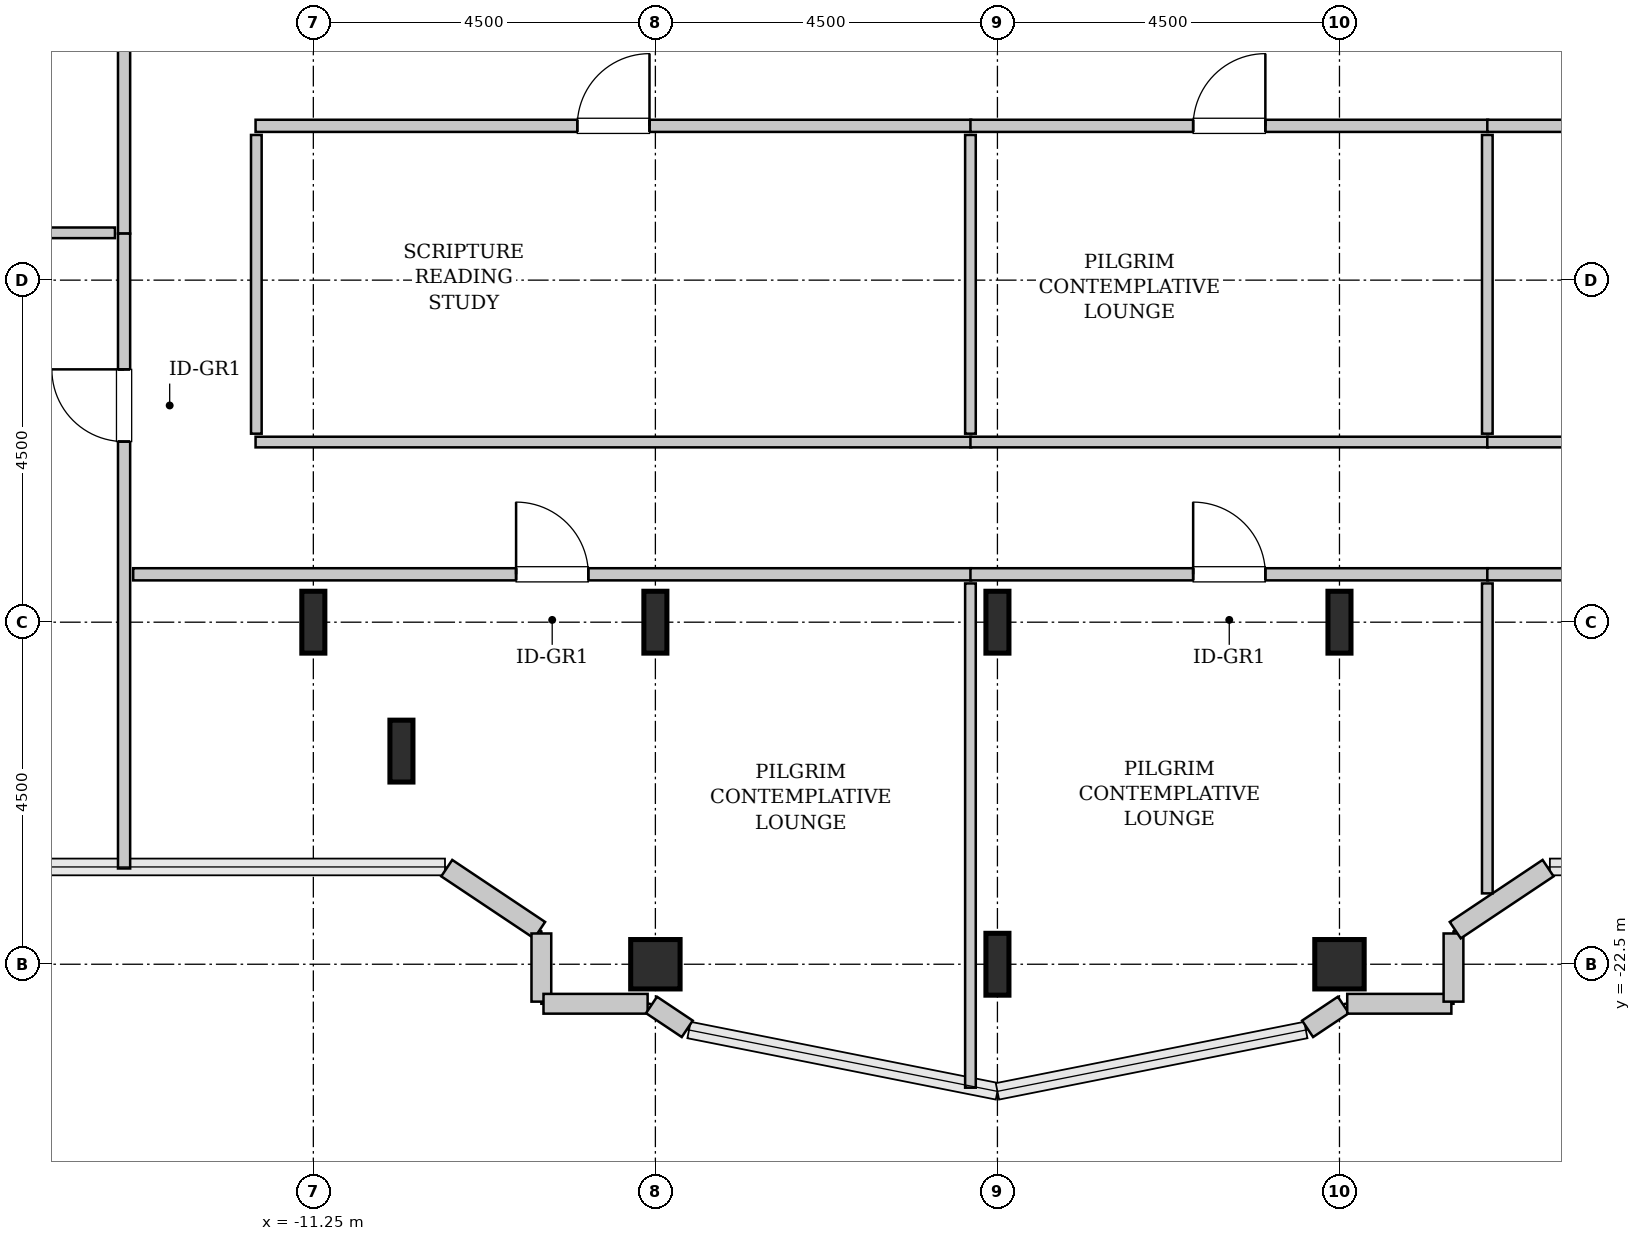
"""IFC4 building model, lengths in metres.
Left out: names, types, materials, properties, quantities, classifications, styles, units other than length and angle.
Written with IfcOpenShell. Run it as: python <this file> out.ifc"""

import sys

from ifc_helpers import new_model, si_unit, direction, frame, frame_2d, origin, origin_2d, place, context, subcontext, project, spatial, rectangle, hollow_rectangle, i_section, extrude, source, transform, mapped, element, fill, save


model = new_model("IFC4")
c1 = context("Model", 3, precision=1e-05, world=origin(), true_north=direction((0.0, 1.0)))
c2 = subcontext(c1, "Body", "Model", "MODEL_VIEW")
j1 = project(units=[si_unit("LENGTHUNIT", "METRE"), si_unit("PLANEANGLEUNIT", "RADIAN")], contexts=[c1])
p1 = place(None, origin())
s1 = spatial("IfcSite", under=j1, at=p1, CompositionType="ELEMENT")
p2 = place(p1, origin())
s2 = spatial("IfcBuilding", under=s1, at=p2, CompositionType="ELEMENT")
p3 = place(p2, frame((0.0, 0.0, 221.8)))
s3 = spatial("IfcBuildingStorey", under=s2, at=p3, CompositionType="ELEMENT", Elevation=221.8)
m1 = source(origin(), c2, "Body", "SweptSolid", [
    extrude(i_section(OverallWidth=0.303, OverallDepth=0.814, WebThickness=0.021, FlangeThickness=0.04, FilletRadius=0.03, at=origin_2d()), origin(), (0.0, 0.0, 1.0), 3.8),
])
for number, where, z_axis, x_axis in (
    (1, (-11.25, -18.0, 0.0), (0.0, 0.0, 1.0), (1.0, 0.0, 0.0)),
    (2, (-10.091, -19.696, 0.0), (0.0, 0.0, 1.0), (1.0, 0.0, 0.0)),
):
    element("IfcColumn", number, at=place(p3, frame(where, z_axis=z_axis, x_axis=x_axis)), inside=s3, PredefinedType="COLUMN", context=c2, shape_type="MappedRepresentation", body=[
        mapped(m1, transform((0.0, 0.0, 0.0), x_axis=(1.0, 0.0, 0.0), y_axis=(0.0, 1.0, 0.0), z_axis=(0.0, 0.0, 1.0), scale=1.0)),
    ])
m2 = source(origin(), c2, "Body", "SweptSolid", [
    extrude(hollow_rectangle(XDim=0.65, YDim=0.65, WallThickness=0.032, InnerFilletRadius=0.032, OuterFilletRadius=0.064, at=origin_2d()), origin(), (0.0, 0.0, 1.0), 3.8),
])
p4 = place(p3, frame((-6.75, -22.5, 0.0), z_axis=(0.0, 0.0, 1.0), x_axis=(1.0, 0.0, 0.0)))
e3 = element("IfcColumn", 3, at=p4, inside=s3, PredefinedType="COLUMN", context=c2, shape_type="MappedRepresentation", body=[
    mapped(m2, transform((0.0, 0.0, 0.0), x_axis=(1.0, 0.0, 0.0), y_axis=(0.0, 1.0, 0.0), z_axis=(0.0, 0.0, 1.0), scale=1.0)),
])
for number, where, z_axis, x_axis in (
    (4, (-6.75, -18.0, 0.0), (0.0, 0.0, 1.0), (1.0, 0.0, 0.0)),
    (5, (-2.25, -22.5, 0.0), (0.0, 0.0, 1.0), (1.0, 0.0, 0.0)),
    (6, (-2.25, -18.0, 0.0), (0.0, 0.0, 1.0), (1.0, 0.0, 0.0)),
):
    element("IfcColumn", number, at=place(p3, frame(where, z_axis=z_axis, x_axis=x_axis)), inside=s3, PredefinedType="COLUMN", context=c2, shape_type="MappedRepresentation", body=[
        mapped(m1, transform((0.0, 0.0, 0.0), x_axis=(1.0, 0.0, 0.0), y_axis=(0.0, 1.0, 0.0), z_axis=(0.0, 0.0, 1.0), scale=1.0)),
    ])
p5 = place(p3, frame((2.25, -22.5, 0.0), z_axis=(0.0, 0.0, 1.0), x_axis=(1.0, 0.0, 0.0)))
e7 = element("IfcColumn", 7, at=p5, inside=s3, PredefinedType="COLUMN", context=c2, shape_type="MappedRepresentation", body=[
    mapped(m2, transform((0.0, 0.0, 0.0), x_axis=(1.0, 0.0, 0.0), y_axis=(0.0, 1.0, 0.0), z_axis=(0.0, 0.0, 1.0), scale=1.0)),
])
p6 = place(p3, frame((2.25, -18.0, 0.0), z_axis=(0.0, 0.0, 1.0), x_axis=(1.0, 0.0, 0.0)))
e8 = element("IfcColumn", 8, at=p6, inside=s3, PredefinedType="COLUMN", context=c2, shape_type="MappedRepresentation", body=[
    mapped(m1, transform((0.0, 0.0, 0.0), x_axis=(1.0, 0.0, 0.0), y_axis=(0.0, 1.0, 0.0), z_axis=(0.0, 0.0, 1.0), scale=1.0)),
])
m3 = source(origin(), c2, "Body", "SweptSolid", [
    extrude(rectangle(XDim=1.469, YDim=0.26, at=frame_2d((0.734, 0.0))), origin(), (0.0, 0.0, 1.0), 3.55),
])
p7 = place(p3, frame((-9.495, -21.236, 0.0), z_axis=(0.0, 0.0, 1.0), x_axis=(0.831461760506, -0.555581983884, 0.0)))
e9 = element("IfcWall", 9, at=p7, inside=s3, PredefinedType="SOLIDWALL", context=c2, shape_type="MappedRepresentation", body=[
    mapped(m3, transform((0.0, 0.0, 0.0), x_axis=(1.0, 0.0, 0.0), y_axis=(0.0, 1.0, 0.0), z_axis=(0.0, 0.0, 1.0), scale=1.0)),
])
m4 = source(origin(), c2, "Body", "SweptSolid", [
    extrude(rectangle(XDim=0.897, YDim=0.26, at=frame_2d((0.448, 0.0))), origin(), (0.0, 0.0, 1.0), 3.55),
])
p8 = place(p3, frame((-8.25, -22.095, 0.0), z_axis=(0.0, 0.0, 1.0), x_axis=(0.0, -1.0, 0.0)))
e10 = element("IfcWall", 10, at=p8, inside=s3, PredefinedType="SOLIDWALL", context=c2, shape_type="MappedRepresentation", body=[
    mapped(m4, transform((0.0, 0.0, 0.0), x_axis=(1.0, 0.0, 0.0), y_axis=(0.0, 1.0, 0.0), z_axis=(0.0, 0.0, 1.0), scale=1.0)),
])
m5 = source(origin(), c2, "Body", "SweptSolid", [
    extrude(rectangle(XDim=1.37, YDim=0.26, at=frame_2d((0.685, 0.0))), origin(), (0.0, 0.0, 1.0), 3.55),
])
p9 = place(p3, frame((-8.222, -23.02, 0.0), z_axis=(0.0, 0.0, 1.0), x_axis=(1.0, 0.0, 0.0)))
e11 = element("IfcWall", 11, at=p9, inside=s3, PredefinedType="SOLIDWALL", context=c2, shape_type="MappedRepresentation", body=[
    mapped(m5, transform((0.0, 0.0, 0.0), x_axis=(1.0, 0.0, 0.0), y_axis=(0.0, 1.0, 0.0), z_axis=(0.0, 0.0, 1.0), scale=1.0)),
])
m6 = source(origin(), c2, "Body", "SweptSolid", [
    extrude(rectangle(XDim=0.565, YDim=0.26, at=frame_2d((0.283, 0.0))), origin(), (0.0, 0.0, 1.0), 3.55),
])
for number, where, z_axis, x_axis in (
    (12, (-6.801, -23.036, 0.0), (0.0, 0.0, 1.0), (0.832, -0.555, 0.0)),
    (13, (1.831, -23.35, 0.0), (0.0, 0.0, 1.0), (0.832, 0.555, 0.0)),
):
    element("IfcWall", number, at=place(p3, frame(where, z_axis=z_axis, x_axis=x_axis)), inside=s3, PredefinedType="SOLIDWALL", context=c2, shape_type="MappedRepresentation", body=[
        mapped(m6, transform((0.0, 0.0, 0.0), x_axis=(1.0, 0.0, 0.0), y_axis=(0.0, 1.0, 0.0), z_axis=(0.0, 0.0, 1.0), scale=1.0)),
    ])
p10 = place(p3, frame((2.352, -23.02, 0.0), z_axis=(0.0, 0.0, 1.0), x_axis=(1.0, 0.0, 0.0)))
e14 = element("IfcWall", 14, at=p10, inside=s3, PredefinedType="SOLIDWALL", context=c2, shape_type="MappedRepresentation", body=[
    mapped(m5, transform((0.0, 0.0, 0.0), x_axis=(1.0, 0.0, 0.0), y_axis=(0.0, 1.0, 0.0), z_axis=(0.0, 0.0, 1.0), scale=1.0)),
])
p11 = place(p3, frame((3.75, -22.992, 0.0), z_axis=(0.0, 0.0, 1.0), x_axis=(0.0, 1.0, 0.0)))
e15 = element("IfcWall", 15, at=p11, inside=s3, PredefinedType="SOLIDWALL", context=c2, shape_type="MappedRepresentation", body=[
    mapped(m4, transform((0.0, 0.0, 0.0), x_axis=(1.0, 0.0, 0.0), y_axis=(0.0, 1.0, 0.0), z_axis=(0.0, 0.0, 1.0), scale=1.0)),
])
p12 = place(p3, frame((3.773, -22.052, 0.0), z_axis=(0.0, 0.0, 1.0), x_axis=(0.831461760506, 0.555581983884, 0.0)))
e16 = element("IfcWall", 16, at=p12, inside=s3, PredefinedType="SOLIDWALL", context=c2, shape_type="MappedRepresentation", body=[
    mapped(m3, transform((0.0, 0.0, 0.0), x_axis=(1.0, 0.0, 0.0), y_axis=(0.0, 1.0, 0.0), z_axis=(0.0, 0.0, 1.0), scale=1.0)),
])
m7 = source(origin(), c2, "Body", "SweptSolid", [
    extrude(rectangle(XDim=10.093, YDim=0.16, at=frame_2d((5.046, 0.0))), origin(), (0.0, 0.0, 1.0), 3.535),
])
p13 = place(p3, frame((-13.74, -12.887, 0.0), z_axis=(0.0, 0.0, 1.0), x_axis=(0.0, 1.0, 0.0)))
e17 = element("IfcWall", 17, at=p13, inside=s3, PredefinedType="PARTITIONING", context=c2, shape_type="MappedRepresentation", body=[
    mapped(m7, transform((0.0, 0.0, 0.0), x_axis=(1.0, 0.0, 0.0), y_axis=(0.0, 1.0, 0.0), z_axis=(0.0, 0.0, 1.0), scale=1.0)),
])
p14 = place(p13, frame((4.571, 0.0, 0.0)))
e18 = element("IfcOpeningElement", 18, at=p14, cuts=e17, PredefinedType="OPENING", context=c2, shape_type="SweptSolid", body=[
    extrude(rectangle(XDim=0.95, YDim=2.1, at=frame_2d((0.475, 1.05))), frame((0.0, 0.09, 0.0), z_axis=(0.0, -1.0, 0.0), x_axis=(1.0, 0.0, 0.0)), (0.0, 0.0, 1.0), 0.18),
])
m8 = source(origin(), c2, "Body", "SweptSolid", [
    extrude(rectangle(XDim=11.43, YDim=0.14, at=frame_2d((5.715, 0.0))), origin(), (0.0, 0.0, 1.0), 3.535),
])
p15 = place(p3, frame((-25.29, -12.877, 0.0), z_axis=(0.0, 0.0, 1.0), x_axis=(1.0, 0.0, 0.0)))
e19 = element("IfcWall", 19, at=p15, inside=s3, PredefinedType="PARTITIONING", context=c2, shape_type="MappedRepresentation", body=[
    mapped(m8, transform((0.0, 0.0, 0.0), x_axis=(1.0, 0.0, 0.0), y_axis=(0.0, 1.0, 0.0), z_axis=(0.0, 0.0, 1.0), scale=1.0)),
])
m9 = source(origin(), c2, "Body", "SweptSolid", [
    extrude(rectangle(XDim=8.353, YDim=0.16, at=frame_2d((4.176, 0.0))), origin(), (0.0, 0.0, 1.0), 3.535),
])
p16 = place(p3, frame((-13.74, -21.24, 0.0), z_axis=(0.0, 0.0, 1.0), x_axis=(0.0, 1.0, 0.0)))
e20 = element("IfcWall", 20, at=p16, inside=s3, PredefinedType="PARTITIONING", context=c2, shape_type="MappedRepresentation", body=[
    mapped(m9, transform((0.0, 0.0, 0.0), x_axis=(1.0, 0.0, 0.0), y_axis=(0.0, 1.0, 0.0), z_axis=(0.0, 0.0, 1.0), scale=1.0)),
])
p17 = place(p16, frame((5.616, 0.0, 0.0)))
e21 = element("IfcOpeningElement", 21, at=p17, cuts=e20, PredefinedType="OPENING", context=c2, shape_type="SweptSolid", body=[
    extrude(rectangle(XDim=0.95, YDim=2.1, at=frame_2d((0.475, 1.05))), frame((0.0, 0.09, 0.0), z_axis=(0.0, -1.0, 0.0), x_axis=(1.0, 0.0, 0.0)), (0.0, 0.0, 1.0), 0.18),
])
m10 = source(origin(), c2, "Body", "SweptSolid", [
    extrude(rectangle(XDim=11.025, YDim=0.16, at=frame_2d((5.513, 0.0))), origin(), (0.0, 0.0, 1.0), 3.535),
])
p18 = place(p3, frame((-13.62, -17.37, 0.0), z_axis=(0.0, 0.0, 1.0), x_axis=(1.0, 0.0, 0.0)))
e22 = element("IfcWall", 22, at=p18, inside=s3, PredefinedType="PARTITIONING", context=c2, shape_type="MappedRepresentation", body=[
    mapped(m10, transform((0.0, 0.0, 0.0), x_axis=(1.0, 0.0, 0.0), y_axis=(0.0, 1.0, 0.0), z_axis=(0.0, 0.0, 1.0), scale=1.0)),
])
p19 = place(p18, frame((5.038, 0.0, 0.0)))
e23 = element("IfcOpeningElement", 23, at=p19, cuts=e22, PredefinedType="OPENING", context=c2, shape_type="SweptSolid", body=[
    extrude(rectangle(XDim=0.95, YDim=2.1, at=frame_2d((0.475, 1.05))), frame((0.0, 0.09, 0.0), z_axis=(0.0, -1.0, 0.0), x_axis=(1.0, 0.0, 0.0)), (0.0, 0.0, 1.0), 0.18),
])
m11 = source(origin(), c2, "Body", "SweptSolid", [
    extrude(rectangle(XDim=6.634, YDim=0.14, at=frame_2d((3.317, 0.0))), origin(), (0.0, 0.0, 1.0), 2.925),
])
p20 = place(p3, frame((-2.605, -24.124, 0.0), z_axis=(0.0, 0.0, 1.0), x_axis=(0.0, 1.0, 0.0)))
e24 = element("IfcWall", 24, at=p20, inside=s3, PredefinedType="PARTITIONING", context=c2, shape_type="MappedRepresentation", body=[
    mapped(m11, transform((0.0, 0.0, 0.0), x_axis=(1.0, 0.0, 0.0), y_axis=(0.0, 1.0, 0.0), z_axis=(0.0, 0.0, 1.0), scale=1.0)),
])
m12 = source(origin(), c2, "Body", "SweptSolid", [
    extrude(rectangle(XDim=9.415, YDim=0.16, at=frame_2d((4.708, 0.0))), origin(), (0.0, 0.0, 1.0), 3.535),
])
p21 = place(p3, frame((-12.01, -11.47, 0.0), z_axis=(0.0, 0.0, 1.0), x_axis=(1.0, 0.0, 0.0)))
e25 = element("IfcWall", 25, at=p21, inside=s3, PredefinedType="PARTITIONING", context=c2, shape_type="MappedRepresentation", body=[
    mapped(m12, transform((0.0, 0.0, 0.0), x_axis=(1.0, 0.0, 0.0), y_axis=(0.0, 1.0, 0.0), z_axis=(0.0, 0.0, 1.0), scale=1.0)),
])
p22 = place(p21, frame((4.232, 0.0, 0.0)))
e26 = element("IfcOpeningElement", 26, at=p22, cuts=e25, PredefinedType="OPENING", context=c2, shape_type="SweptSolid", body=[
    extrude(rectangle(XDim=0.95, YDim=2.1, at=frame_2d((0.475, 1.05))), frame((0.0, 0.09, 0.0), z_axis=(0.0, -1.0, 0.0), x_axis=(1.0, 0.0, 0.0)), (0.0, 0.0, 1.0), 0.18),
])
m13 = source(origin(), c2, "Body", "SweptSolid", [
    extrude(rectangle(XDim=9.415, YDim=0.14, at=frame_2d((4.708, 0.0))), origin(), (0.0, 0.0, 1.0), 3.535),
])
p23 = place(p3, frame((-12.01, -15.63, 0.0), z_axis=(0.0, 0.0, 1.0), x_axis=(1.0, 0.0, 0.0)))
e27 = element("IfcWall", 27, at=p23, inside=s3, PredefinedType="PARTITIONING", context=c2, shape_type="MappedRepresentation", body=[
    mapped(m13, transform((0.0, 0.0, 0.0), x_axis=(1.0, 0.0, 0.0), y_axis=(0.0, 1.0, 0.0), z_axis=(0.0, 0.0, 1.0), scale=1.0)),
])
m14 = source(origin(), c2, "Body", "SweptSolid", [
    extrude(rectangle(XDim=3.93, YDim=0.14, at=frame_2d((1.965, 0.0))), origin(), (0.0, 0.0, 1.0), 3.535),
])
for number, where, z_axis, x_axis in (
    (28, (-12.0, -15.52, 0.0), (0.0, 0.0, 1.0), (0.0, 1.0, 0.0)),
    (29, (-2.605, -15.52, 0.0), (0.0, 0.0, 1.0), (0.0, 1.0, 0.0)),
):
    element("IfcWall", number, at=place(p3, frame(where, z_axis=z_axis, x_axis=x_axis)), inside=s3, PredefinedType="PARTITIONING", context=c2, shape_type="MappedRepresentation", body=[
        mapped(m14, transform((0.0, 0.0, 0.0), x_axis=(1.0, 0.0, 0.0), y_axis=(0.0, 1.0, 0.0), z_axis=(0.0, 0.0, 1.0), scale=1.0)),
    ])
m15 = source(origin(), c2, "Body", "SweptSolid", [
    extrude(rectangle(XDim=6.81, YDim=0.16, at=frame_2d((3.405, 0.0))), origin(), (0.0, 0.0, 1.0), 3.535),
])
p24 = place(p3, frame((-2.605, -17.37, 0.0), z_axis=(0.0, 0.0, 1.0), x_axis=(1.0, 0.0, 0.0)))
e30 = element("IfcWall", 30, at=p24, inside=s3, PredefinedType="PARTITIONING", context=c2, shape_type="MappedRepresentation", body=[
    mapped(m15, transform((0.0, 0.0, 0.0), x_axis=(1.0, 0.0, 0.0), y_axis=(0.0, 1.0, 0.0), z_axis=(0.0, 0.0, 1.0), scale=1.0)),
])
p25 = place(p24, frame((2.93, 0.0, 0.0)))
e31 = element("IfcOpeningElement", 31, at=p25, cuts=e30, PredefinedType="OPENING", context=c2, shape_type="SweptSolid", body=[
    extrude(rectangle(XDim=0.95, YDim=2.1, at=frame_2d((0.475, 1.05))), frame((0.0, 0.09, 0.0), z_axis=(0.0, -1.0, 0.0), x_axis=(1.0, 0.0, 0.0)), (0.0, 0.0, 1.0), 0.18),
])
m16 = source(origin(), c2, "Body", "SweptSolid", [
    extrude(rectangle(XDim=4.078, YDim=0.14, at=frame_2d((2.039, 0.0))), origin(), (0.0, 0.0, 1.0), 3.535),
])
p26 = place(p3, frame((4.195, -21.568, 0.0), z_axis=(0.0, 0.0, 1.0), x_axis=(0.0, 1.0, 0.0)))
e32 = element("IfcWall", 32, at=p26, inside=s3, PredefinedType="PARTITIONING", context=c2, shape_type="MappedRepresentation", body=[
    mapped(m16, transform((0.0, 0.0, 0.0), x_axis=(1.0, 0.0, 0.0), y_axis=(0.0, 1.0, 0.0), z_axis=(0.0, 0.0, 1.0), scale=1.0)),
])
p27 = place(p3, frame((-2.605, -11.47, 0.0), z_axis=(0.0, 0.0, 1.0), x_axis=(1.0, 0.0, 0.0)))
e33 = element("IfcWall", 33, at=p27, inside=s3, PredefinedType="PARTITIONING", context=c2, shape_type="MappedRepresentation", body=[
    mapped(m15, transform((0.0, 0.0, 0.0), x_axis=(1.0, 0.0, 0.0), y_axis=(0.0, 1.0, 0.0), z_axis=(0.0, 0.0, 1.0), scale=1.0)),
])
p28 = place(p27, frame((2.93, 0.0, 0.0)))
e34 = element("IfcOpeningElement", 34, at=p28, cuts=e33, PredefinedType="OPENING", context=c2, shape_type="SweptSolid", body=[
    extrude(rectangle(XDim=0.95, YDim=2.1, at=frame_2d((0.475, 1.05))), frame((0.0, 0.09, 0.0), z_axis=(0.0, -1.0, 0.0), x_axis=(1.0, 0.0, 0.0)), (0.0, 0.0, 1.0), 0.18),
])
m17 = source(origin(), c2, "Body", "SweptSolid", [
    extrude(rectangle(XDim=6.81, YDim=0.14, at=frame_2d((3.405, 0.0))), origin(), (0.0, 0.0, 1.0), 3.535),
])
p29 = place(p3, frame((-2.605, -15.63, 0.0), z_axis=(0.0, 0.0, 1.0), x_axis=(1.0, 0.0, 0.0)))
e35 = element("IfcWall", 35, at=p29, inside=s3, PredefinedType="PARTITIONING", context=c2, shape_type="MappedRepresentation", body=[
    mapped(m17, transform((0.0, 0.0, 0.0), x_axis=(1.0, 0.0, 0.0), y_axis=(0.0, 1.0, 0.0), z_axis=(0.0, 0.0, 1.0), scale=1.0)),
])
p30 = place(p3, frame((4.195, -15.52, 0.0), z_axis=(0.0, 0.0, 1.0), x_axis=(0.0, 1.0, 0.0)))
e36 = element("IfcWall", 36, at=p30, inside=s3, PredefinedType="PARTITIONING", context=c2, shape_type="MappedRepresentation", body=[
    mapped(m14, transform((0.0, 0.0, 0.0), x_axis=(1.0, 0.0, 0.0), y_axis=(0.0, 1.0, 0.0), z_axis=(0.0, 0.0, 1.0), scale=1.0)),
])
m18 = source(origin(), c2, "Body", "SweptSolid", [
    extrude(rectangle(XDim=9.425, YDim=0.16, at=frame_2d((4.712, 0.0))), origin(), (0.0, 0.0, 1.0), 3.535),
])
p31 = place(p3, frame((4.195, -17.37, 0.0), z_axis=(0.0, 0.0, 1.0), x_axis=(1.0, 0.0, 0.0)))
e37 = element("IfcWall", 37, at=p31, inside=s3, PredefinedType="PARTITIONING", context=c2, shape_type="MappedRepresentation", body=[
    mapped(m18, transform((0.0, 0.0, 0.0), x_axis=(1.0, 0.0, 0.0), y_axis=(0.0, 1.0, 0.0), z_axis=(0.0, 0.0, 1.0), scale=1.0)),
])
p32 = place(p31, frame((4.238, 0.0, 0.0)))
e38 = element("IfcOpeningElement", 38, at=p32, cuts=e37, PredefinedType="OPENING", context=c2, shape_type="SweptSolid", body=[
    extrude(rectangle(XDim=0.95, YDim=2.1, at=frame_2d((0.475, 1.05))), frame((0.0, 0.09, 0.0), z_axis=(0.0, -1.0, 0.0), x_axis=(1.0, 0.0, 0.0)), (0.0, 0.0, 1.0), 0.18),
])
m19 = source(origin(), c2, "Body", "SweptSolid", [
    extrude(rectangle(XDim=7.815, YDim=0.16, at=frame_2d((3.907, 0.0))), origin(), (0.0, 0.0, 1.0), 3.535),
])
p33 = place(p3, frame((4.195, -11.47, 0.0), z_axis=(0.0, 0.0, 1.0), x_axis=(1.0, 0.0, 0.0)))
e39 = element("IfcWall", 39, at=p33, inside=s3, PredefinedType="PARTITIONING", context=c2, shape_type="MappedRepresentation", body=[
    mapped(m19, transform((0.0, 0.0, 0.0), x_axis=(1.0, 0.0, 0.0), y_axis=(0.0, 1.0, 0.0), z_axis=(0.0, 0.0, 1.0), scale=1.0)),
])
p34 = place(p33, frame((3.433, 0.0, 0.0)))
e40 = element("IfcOpeningElement", 40, at=p34, cuts=e39, PredefinedType="OPENING", context=c2, shape_type="SweptSolid", body=[
    extrude(rectangle(XDim=0.95, YDim=2.1, at=frame_2d((0.475, 1.05))), frame((0.0, 0.09, 0.0), z_axis=(0.0, -1.0, 0.0), x_axis=(1.0, 0.0, 0.0)), (0.0, 0.0, 1.0), 0.18),
])
m20 = source(origin(), c2, "Body", "SweptSolid", [
    extrude(rectangle(XDim=7.815, YDim=0.14, at=frame_2d((3.907, 0.0))), origin(), (0.0, 0.0, 1.0), 3.535),
])
p35 = place(p3, frame((4.195, -15.63, 0.0), z_axis=(0.0, 0.0, 1.0), x_axis=(1.0, 0.0, 0.0)))
e41 = element("IfcWall", 41, at=p35, inside=s3, PredefinedType="PARTITIONING", context=c2, shape_type="MappedRepresentation", body=[
    mapped(m20, transform((0.0, 0.0, 0.0), x_axis=(1.0, 0.0, 0.0), y_axis=(0.0, 1.0, 0.0), z_axis=(0.0, 0.0, 1.0), scale=1.0)),
])
m21 = source(origin(), c2, "Body", "SweptSolid", [
    extrude(rectangle(XDim=0.95, YDim=2.1, at=frame_2d((0.475, 1.05))), frame((0.0, 0.025, 0.0), z_axis=(0.0, -1.0, 0.0), x_axis=(1.0, 0.0, 0.0)), (0.0, 0.0, 1.0), 0.05),
])
p36 = place(p17, origin())
e42 = element("IfcDoor", 42, at=p36, inside=s3, OperationType="SINGLE_SWING_RIGHT", PredefinedType="DOOR", context=c2, shape_type="MappedRepresentation", body=[
    mapped(m21, transform((0.0, 0.0, 0.0), x_axis=(1.0, 0.0, 0.0), y_axis=(0.0, 1.0, 0.0), z_axis=(0.0, 0.0, 1.0), scale=1.0)),
])
fill(e21, e42)
p37 = place(p19, origin())
e43 = element("IfcDoor", 43, at=p37, inside=s3, OperationType="SINGLE_SWING_LEFT", PredefinedType="DOOR", context=c2, shape_type="MappedRepresentation", body=[
    mapped(m21, transform((0.0, 0.0, 0.0), x_axis=(1.0, 0.0, 0.0), y_axis=(0.0, 1.0, 0.0), z_axis=(0.0, 0.0, 1.0), scale=1.0)),
])
fill(e23, e43)
p38 = place(p22, origin())
e44 = element("IfcDoor", 44, at=p38, inside=s3, OperationType="SINGLE_SWING_RIGHT", PredefinedType="DOOR", context=c2, shape_type="MappedRepresentation", body=[
    mapped(m21, transform((0.0, 0.0, 0.0), x_axis=(1.0, 0.0, 0.0), y_axis=(0.0, 1.0, 0.0), z_axis=(0.0, 0.0, 1.0), scale=1.0)),
])
fill(e26, e44)
p39 = place(p25, origin())
e45 = element("IfcDoor", 45, at=p39, inside=s3, OperationType="SINGLE_SWING_LEFT", PredefinedType="DOOR", context=c2, shape_type="MappedRepresentation", body=[
    mapped(m21, transform((0.0, 0.0, 0.0), x_axis=(1.0, 0.0, 0.0), y_axis=(0.0, 1.0, 0.0), z_axis=(0.0, 0.0, 1.0), scale=1.0)),
])
fill(e31, e45)
p40 = place(p28, origin())
e46 = element("IfcDoor", 46, at=p40, inside=s3, OperationType="SINGLE_SWING_RIGHT", PredefinedType="DOOR", context=c2, shape_type="MappedRepresentation", body=[
    mapped(m21, transform((0.0, 0.0, 0.0), x_axis=(1.0, 0.0, 0.0), y_axis=(0.0, 1.0, 0.0), z_axis=(0.0, 0.0, 1.0), scale=1.0)),
])
fill(e34, e46)
save(model, sys.argv[1])
